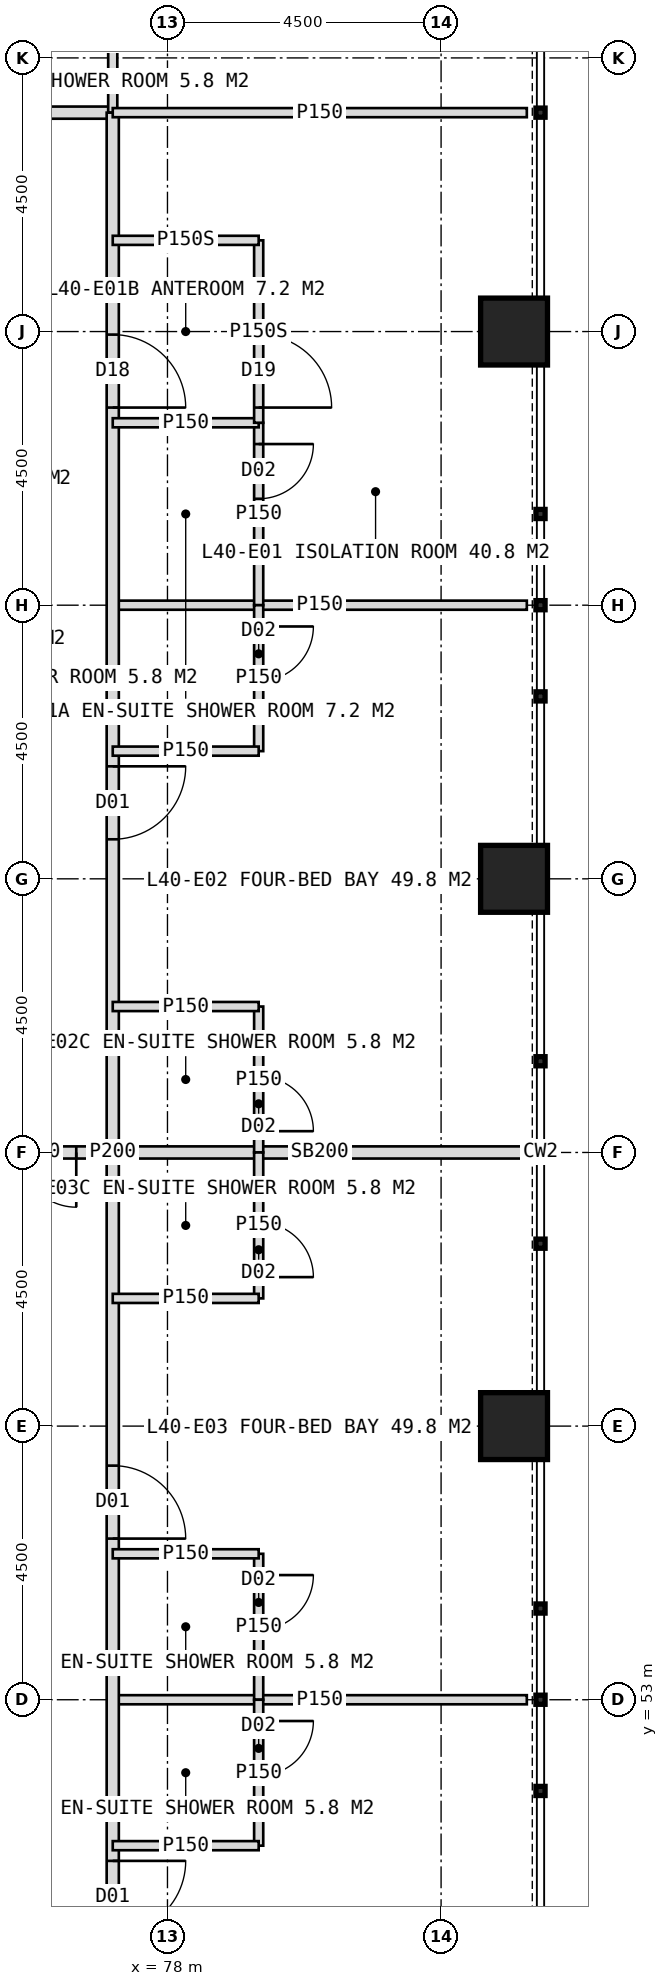
"""IFC4 building model, lengths in metres.
Left out: names, types, materials, properties, quantities, classifications, styles, units other than length and angle.
Written with IfcOpenShell. Run it as: python <this file> out.ifc"""

import sys

from ifc_helpers import new_model, si_unit, direction, frame, frame_2d, origin, origin_2d, place, context, subcontext, project, spatial, rectangle, hollow_rectangle, extrude, element, fill, save


model = new_model("IFC4")
c1 = context("Model", 3, precision=1e-05, world=origin(), true_north=direction((0.0, 1.0)))
c2 = subcontext(c1, "Body", "Model", "MODEL_VIEW")
j1 = project(units=[si_unit("LENGTHUNIT", "METRE"), si_unit("PLANEANGLEUNIT", "RADIAN")], contexts=[c1])
p1 = place(None, origin())
s1 = spatial("IfcSite", under=j1, at=p1, CompositionType="ELEMENT")
p2 = place(p1, origin())
s2 = spatial("IfcBuilding", under=s1, at=p2, CompositionType="ELEMENT")
p3 = place(p2, frame((0.0, 0.0, 168.0)))
s3 = spatial("IfcBuildingStorey", under=s2, at=p3, CompositionType="ELEMENT", Elevation=168.0)
for number, where, z_axis, x_axis in (
    (1, (83.7, 57.5, 0.0), (0.0, 0.0, 1.0), (1.0, 0.0, 0.0)),
    (2, (83.7, 66.5, 0.0), (0.0, 0.0, 1.0), (1.0, 0.0, 0.0)),
    (3, (83.7, 75.5, 0.0), (0.0, 0.0, 1.0), (1.0, 0.0, 0.0)),
):
    element("IfcColumn", number, at=place(p3, frame(where, z_axis=z_axis, x_axis=x_axis)), inside=s3, PredefinedType="COLUMN", context=c2, shape_type="SweptSolid", body=[
        extrude(hollow_rectangle(XDim=1.1, YDim=1.1, WallThickness=0.1, at=origin_2d()), origin(), (0.0, 0.0, 1.0), 4.0),
    ])
p4 = place(p3, frame((42.9, 79.1, 0.0), z_axis=(0.0, 0.0, 1.0), x_axis=(1.0, 0.0, 0.0)))
e4 = element("IfcWall", 4, at=p4, inside=s3, PredefinedType="PARTITIONING", context=c2, shape_type="SweptSolid", body=[
    extrude(rectangle(XDim=34.2, YDim=0.2, at=frame_2d((17.1, 0.0))), origin(), (0.0, 0.0, 1.0), 3.75),
])
p5 = place(p4, frame((3.55, 0.0, 0.0)))
e5 = element("IfcOpeningElement", 5, at=p5, cuts=e4, PredefinedType="OPENING", context=c2, shape_type="SweptSolid", body=[
    extrude(rectangle(XDim=1.0, YDim=2.1, at=frame_2d((0.5, 1.05))), frame((0.0, 0.11, 0.0), z_axis=(0.0, -1.0, 0.0), x_axis=(1.0, 0.0, 0.0)), (0.0, 0.0, 1.0), 0.22),
])
p6 = place(p4, frame((10.75, 0.0, 0.0)))
e6 = element("IfcOpeningElement", 6, at=p6, cuts=e4, PredefinedType="OPENING", context=c2, shape_type="SweptSolid", body=[
    extrude(rectangle(XDim=1.2, YDim=2.2, at=frame_2d((0.6, 1.1))), frame((0.0, 0.11, 0.0), z_axis=(0.0, -1.0, 0.0), x_axis=(1.0, 0.0, 0.0)), (0.0, 0.0, 1.0), 0.22),
])
p7 = place(p4, frame((20.75, 0.0, 0.0)))
e7 = element("IfcOpeningElement", 7, at=p7, cuts=e4, PredefinedType="OPENING", context=c2, shape_type="SweptSolid", body=[
    extrude(rectangle(XDim=1.2, YDim=2.2, at=frame_2d((0.6, 1.1))), frame((0.0, 0.11, 0.0), z_axis=(0.0, -1.0, 0.0), x_axis=(1.0, 0.0, 0.0)), (0.0, 0.0, 1.0), 0.22),
])
p8 = place(p4, frame((27.25, 0.0, 0.0)))
e8 = element("IfcOpeningElement", 8, at=p8, cuts=e4, PredefinedType="OPENING", context=c2, shape_type="SweptSolid", body=[
    extrude(rectangle(XDim=1.2, YDim=2.2, at=frame_2d((0.6, 1.1))), frame((0.0, 0.11, 0.0), z_axis=(0.0, -1.0, 0.0), x_axis=(1.0, 0.0, 0.0)), (0.0, 0.0, 1.0), 0.22),
])
p9 = place(p3, frame((77.1, 79.1, 0.0), z_axis=(0.0, 0.0, 1.0), x_axis=(0.0, 1.0, 0.0)))
e9 = element("IfcWall", 9, at=p9, inside=s3, PredefinedType="PARTITIONING", context=c2, shape_type="SweptSolid", body=[
    extrude(rectangle(XDim=2.4, YDim=0.15, at=frame_2d((1.2, 0.0))), origin(), (0.0, 0.0, 1.0), 3.75),
])
p10 = place(p3, frame((77.1, 71.0, 0.0), z_axis=(0.0, 0.0, 1.0), x_axis=(1.0, 0.0, 0.0)))
e10 = element("IfcWall", 10, at=p10, inside=s3, PredefinedType="PARTITIONING", context=c2, shape_type="SweptSolid", body=[
    extrude(rectangle(XDim=6.81, YDim=0.15, at=frame_2d((3.405, 0.0))), origin(), (0.0, 0.0, 1.0), 3.75),
])
p11 = place(p3, frame((77.1, 62.0, 0.0), z_axis=(0.0, 0.0, 1.0), x_axis=(1.0, 0.0, 0.0)))
e11 = element("IfcWall", 11, at=p11, inside=s3, PredefinedType="SOLIDWALL", context=c2, shape_type="SweptSolid", body=[
    extrude(rectangle(XDim=6.81, YDim=0.2, at=frame_2d((3.405, 0.0))), origin(), (0.0, 0.0, 1.0), 2.95),
])
p12 = place(p3, frame((77.1, 53.0, 0.0), z_axis=(0.0, 0.0, 1.0), x_axis=(1.0, 0.0, 0.0)))
e12 = element("IfcWall", 12, at=p12, inside=s3, PredefinedType="PARTITIONING", context=c2, shape_type="SweptSolid", body=[
    extrude(rectangle(XDim=6.81, YDim=0.15, at=frame_2d((3.405, 0.0))), origin(), (0.0, 0.0, 1.0), 3.75),
])
p13 = place(p3, frame((77.1, 79.1, 0.0), z_axis=(0.0, 0.0, 1.0), x_axis=(0.0, -1.0, 0.0)))
e13 = element("IfcWall", 13, at=p13, inside=s3, PredefinedType="PARTITIONING", context=c2, shape_type="SweptSolid", body=[
    extrude(rectangle(XDim=34.2, YDim=0.2, at=frame_2d((17.1, 0.0))), origin(), (0.0, 0.0, 1.0), 3.75),
])
p14 = place(p13, frame((3.65, 0.0, 0.0)))
e14 = element("IfcOpeningElement", 14, at=p14, cuts=e13, PredefinedType="OPENING", context=c2, shape_type="SweptSolid", body=[
    extrude(rectangle(XDim=1.2, YDim=2.2, at=frame_2d((0.6, 1.1))), frame((0.0, 0.11, 0.0), z_axis=(0.0, -1.0, 0.0), x_axis=(1.0, 0.0, 0.0)), (0.0, 0.0, 1.0), 0.22),
])
p15 = place(p13, frame((10.75, 0.0, 0.0)))
e15 = element("IfcOpeningElement", 15, at=p15, cuts=e13, PredefinedType="OPENING", context=c2, shape_type="SweptSolid", body=[
    extrude(rectangle(XDim=1.2, YDim=2.2, at=frame_2d((0.6, 1.1))), frame((0.0, 0.11, 0.0), z_axis=(0.0, -1.0, 0.0), x_axis=(1.0, 0.0, 0.0)), (0.0, 0.0, 1.0), 0.22),
])
p16 = place(p13, frame((22.25, 0.0, 0.0)))
e16 = element("IfcOpeningElement", 16, at=p16, cuts=e13, PredefinedType="OPENING", context=c2, shape_type="SweptSolid", body=[
    extrude(rectangle(XDim=1.2, YDim=2.2, at=frame_2d((0.6, 1.1))), frame((0.0, 0.11, 0.0), z_axis=(0.0, -1.0, 0.0), x_axis=(1.0, 0.0, 0.0)), (0.0, 0.0, 1.0), 0.22),
])
p17 = place(p13, frame((28.75, 0.0, 0.0)))
e17 = element("IfcOpeningElement", 17, at=p17, cuts=e13, PredefinedType="OPENING", context=c2, shape_type="SweptSolid", body=[
    extrude(rectangle(XDim=1.2, YDim=2.2, at=frame_2d((0.6, 1.1))), frame((0.0, 0.11, 0.0), z_axis=(0.0, -1.0, 0.0), x_axis=(1.0, 0.0, 0.0)), (0.0, 0.0, 1.0), 0.22),
])
p18 = place(p3, frame((77.1, 79.1, 0.0), z_axis=(0.0, 0.0, 1.0), x_axis=(1.0, 0.0, 0.0)))
e18 = element("IfcWall", 18, at=p18, inside=s3, PredefinedType="PARTITIONING", context=c2, shape_type="SweptSolid", body=[
    extrude(rectangle(XDim=6.81, YDim=0.15, at=frame_2d((3.405, 0.0))), origin(), (0.0, 0.0, 1.0), 3.75),
])
p19 = place(p3, frame((79.5, 74.0, 0.0), z_axis=(0.0, 0.0, 1.0), x_axis=(0.0, -1.0, 0.0)))
e19 = element("IfcWall", 19, at=p19, inside=s3, PredefinedType="PARTITIONING", context=c2, shape_type="SweptSolid", body=[
    extrude(rectangle(XDim=3.0, YDim=0.15, at=frame_2d((1.5, 0.0))), origin(), (0.0, 0.0, 1.0), 3.75),
])
p20 = place(p19, frame((0.35, 0.0, 0.0)))
e20 = element("IfcOpeningElement", 20, at=p20, cuts=e19, PredefinedType="OPENING", context=c2, shape_type="SweptSolid", body=[
    extrude(rectangle(XDim=0.9, YDim=2.1, at=frame_2d((0.45, 1.05))), frame((0.0, 0.085, 0.0), z_axis=(0.0, -1.0, 0.0), x_axis=(1.0, 0.0, 0.0)), (0.0, 0.0, 1.0), 0.17),
])
p21 = place(p3, frame((77.1, 74.0, 0.0), z_axis=(0.0, 0.0, 1.0), x_axis=(1.0, 0.0, 0.0)))
e21 = element("IfcWall", 21, at=p21, inside=s3, PredefinedType="PARTITIONING", context=c2, shape_type="SweptSolid", body=[
    extrude(rectangle(XDim=2.4, YDim=0.15, at=frame_2d((1.2, 0.0))), origin(), (0.0, 0.0, 1.0), 3.75),
])
p22 = place(p3, frame((79.5, 77.0, 0.0), z_axis=(0.0, 0.0, 1.0), x_axis=(0.0, -1.0, 0.0)))
e22 = element("IfcWall", 22, at=p22, inside=s3, PredefinedType="PARTITIONING", context=c2, shape_type="SweptSolid", body=[
    extrude(rectangle(XDim=3.0, YDim=0.15, at=frame_2d((1.5, 0.0))), origin(), (0.0, 0.0, 1.0), 3.75),
])
p23 = place(p22, frame((1.55, 0.0, 0.0)))
e23 = element("IfcOpeningElement", 23, at=p23, cuts=e22, PredefinedType="OPENING", context=c2, shape_type="SweptSolid", body=[
    extrude(rectangle(XDim=1.2, YDim=2.2, at=frame_2d((0.6, 1.1))), frame((0.0, 0.085, 0.0), z_axis=(0.0, -1.0, 0.0), x_axis=(1.0, 0.0, 0.0)), (0.0, 0.0, 1.0), 0.17),
])
p24 = place(p3, frame((77.1, 77.0, 0.0), z_axis=(0.0, 0.0, 1.0), x_axis=(1.0, 0.0, 0.0)))
e24 = element("IfcWall", 24, at=p24, inside=s3, PredefinedType="PARTITIONING", context=c2, shape_type="SweptSolid", body=[
    extrude(rectangle(XDim=2.4, YDim=0.15, at=frame_2d((1.2, 0.0))), origin(), (0.0, 0.0, 1.0), 3.75),
])
p25 = place(p3, frame((79.5, 71.0, 0.0), z_axis=(0.0, 0.0, 1.0), x_axis=(0.0, -1.0, 0.0)))
e25 = element("IfcWall", 25, at=p25, inside=s3, PredefinedType="PARTITIONING", context=c2, shape_type="SweptSolid", body=[
    extrude(rectangle(XDim=2.4, YDim=0.15, at=frame_2d((1.2, 0.0))), origin(), (0.0, 0.0, 1.0), 3.75),
])
p26 = place(p25, frame((0.35, 0.0, 0.0)))
e26 = element("IfcOpeningElement", 26, at=p26, cuts=e25, PredefinedType="OPENING", context=c2, shape_type="SweptSolid", body=[
    extrude(rectangle(XDim=0.9, YDim=2.1, at=frame_2d((0.45, 1.05))), frame((0.0, 0.085, 0.0), z_axis=(0.0, -1.0, 0.0), x_axis=(1.0, 0.0, 0.0)), (0.0, 0.0, 1.0), 0.17),
])
p27 = place(p3, frame((77.1, 68.6, 0.0), z_axis=(0.0, 0.0, 1.0), x_axis=(1.0, 0.0, 0.0)))
e27 = element("IfcWall", 27, at=p27, inside=s3, PredefinedType="PARTITIONING", context=c2, shape_type="SweptSolid", body=[
    extrude(rectangle(XDim=2.4, YDim=0.15, at=frame_2d((1.2, 0.0))), origin(), (0.0, 0.0, 1.0), 3.75),
])
p28 = place(p3, frame((79.5, 64.4, 0.0), z_axis=(0.0, 0.0, 1.0), x_axis=(0.0, -1.0, 0.0)))
e28 = element("IfcWall", 28, at=p28, inside=s3, PredefinedType="PARTITIONING", context=c2, shape_type="SweptSolid", body=[
    extrude(rectangle(XDim=2.4, YDim=0.15, at=frame_2d((1.2, 0.0))), origin(), (0.0, 0.0, 1.0), 3.75),
])
p29 = place(p28, frame((1.15, 0.0, 0.0)))
e29 = element("IfcOpeningElement", 29, at=p29, cuts=e28, PredefinedType="OPENING", context=c2, shape_type="SweptSolid", body=[
    extrude(rectangle(XDim=0.9, YDim=2.1, at=frame_2d((0.45, 1.05))), frame((0.0, 0.085, 0.0), z_axis=(0.0, -1.0, 0.0), x_axis=(1.0, 0.0, 0.0)), (0.0, 0.0, 1.0), 0.17),
])
p30 = place(p3, frame((77.1, 64.4, 0.0), z_axis=(0.0, 0.0, 1.0), x_axis=(1.0, 0.0, 0.0)))
e30 = element("IfcWall", 30, at=p30, inside=s3, PredefinedType="PARTITIONING", context=c2, shape_type="SweptSolid", body=[
    extrude(rectangle(XDim=2.4, YDim=0.15, at=frame_2d((1.2, 0.0))), origin(), (0.0, 0.0, 1.0), 3.75),
])
p31 = place(p3, frame((79.5, 55.4, 0.0), z_axis=(0.0, 0.0, 1.0), x_axis=(0.0, -1.0, 0.0)))
e31 = element("IfcWall", 31, at=p31, inside=s3, PredefinedType="PARTITIONING", context=c2, shape_type="SweptSolid", body=[
    extrude(rectangle(XDim=2.4, YDim=0.15, at=frame_2d((1.2, 0.0))), origin(), (0.0, 0.0, 1.0), 3.75),
])
p32 = place(p31, frame((0.35, 0.0, 0.0)))
e32 = element("IfcOpeningElement", 32, at=p32, cuts=e31, PredefinedType="OPENING", context=c2, shape_type="SweptSolid", body=[
    extrude(rectangle(XDim=0.9, YDim=2.1, at=frame_2d((0.45, 1.05))), frame((0.0, 0.085, 0.0), z_axis=(0.0, -1.0, 0.0), x_axis=(1.0, 0.0, 0.0)), (0.0, 0.0, 1.0), 0.17),
])
p33 = place(p3, frame((77.1, 55.4, 0.0), z_axis=(0.0, 0.0, 1.0), x_axis=(1.0, 0.0, 0.0)))
e33 = element("IfcWall", 33, at=p33, inside=s3, PredefinedType="PARTITIONING", context=c2, shape_type="SweptSolid", body=[
    extrude(rectangle(XDim=2.4, YDim=0.15, at=frame_2d((1.2, 0.0))), origin(), (0.0, 0.0, 1.0), 3.75),
])
p34 = place(p3, frame((79.5, 62.0, 0.0), z_axis=(0.0, 0.0, 1.0), x_axis=(0.0, -1.0, 0.0)))
e34 = element("IfcWall", 34, at=p34, inside=s3, PredefinedType="PARTITIONING", context=c2, shape_type="SweptSolid", body=[
    extrude(rectangle(XDim=2.4, YDim=0.15, at=frame_2d((1.2, 0.0))), origin(), (0.0, 0.0, 1.0), 3.75),
])
p35 = place(p34, frame((1.15, 0.0, 0.0)))
e35 = element("IfcOpeningElement", 35, at=p35, cuts=e34, PredefinedType="OPENING", context=c2, shape_type="SweptSolid", body=[
    extrude(rectangle(XDim=0.9, YDim=2.1, at=frame_2d((0.45, 1.05))), frame((0.0, 0.085, 0.0), z_axis=(0.0, -1.0, 0.0), x_axis=(1.0, 0.0, 0.0)), (0.0, 0.0, 1.0), 0.17),
])
p36 = place(p3, frame((77.1, 59.6, 0.0), z_axis=(0.0, 0.0, 1.0), x_axis=(1.0, 0.0, 0.0)))
e36 = element("IfcWall", 36, at=p36, inside=s3, PredefinedType="PARTITIONING", context=c2, shape_type="SweptSolid", body=[
    extrude(rectangle(XDim=2.4, YDim=0.15, at=frame_2d((1.2, 0.0))), origin(), (0.0, 0.0, 1.0), 3.75),
])
p37 = place(p3, frame((79.5, 53.0, 0.0), z_axis=(0.0, 0.0, 1.0), x_axis=(0.0, -1.0, 0.0)))
e37 = element("IfcWall", 37, at=p37, inside=s3, PredefinedType="PARTITIONING", context=c2, shape_type="SweptSolid", body=[
    extrude(rectangle(XDim=2.4, YDim=0.15, at=frame_2d((1.2, 0.0))), origin(), (0.0, 0.0, 1.0), 3.75),
])
p38 = place(p37, frame((0.35, 0.0, 0.0)))
e38 = element("IfcOpeningElement", 38, at=p38, cuts=e37, PredefinedType="OPENING", context=c2, shape_type="SweptSolid", body=[
    extrude(rectangle(XDim=0.9, YDim=2.1, at=frame_2d((0.45, 1.05))), frame((0.0, 0.085, 0.0), z_axis=(0.0, -1.0, 0.0), x_axis=(1.0, 0.0, 0.0)), (0.0, 0.0, 1.0), 0.17),
])
p39 = place(p3, frame((77.1, 50.6, 0.0), z_axis=(0.0, 0.0, 1.0), x_axis=(1.0, 0.0, 0.0)))
e39 = element("IfcWall", 39, at=p39, inside=s3, PredefinedType="PARTITIONING", context=c2, shape_type="SweptSolid", body=[
    extrude(rectangle(XDim=2.4, YDim=0.15, at=frame_2d((1.2, 0.0))), origin(), (0.0, 0.0, 1.0), 3.75),
])
p40 = place(p3, frame((74.4, 62.0, 0.0), z_axis=(0.0, 0.0, 1.0), x_axis=(1.0, 0.0, 0.0)))
e40 = element("IfcWall", 40, at=p40, inside=s3, PredefinedType="SOLIDWALL", context=c2, shape_type="SweptSolid", body=[
    extrude(rectangle(XDim=2.7, YDim=0.2, at=frame_2d((1.35, 0.0))), origin(), (0.0, 0.0, 1.0), 2.95),
])
p41 = place(p40, frame((0.3, 0.0, 0.0)))
e41 = element("IfcOpeningElement", 41, at=p41, cuts=e40, PredefinedType="OPENING", context=c2, shape_type="SweptSolid", body=[
    extrude(rectangle(XDim=1.8, YDim=2.2, at=frame_2d((0.9, 1.1))), frame((0.0, 0.11, 0.0), z_axis=(0.0, -1.0, 0.0), x_axis=(1.0, 0.0, 0.0)), (0.0, 0.0, 1.0), 0.22),
])
p42 = place(p23, origin())
e42 = element("IfcDoor", 42, at=p42, inside=s3, OperationType="SINGLE_SWING_RIGHT", PredefinedType="DOOR", context=c2, shape_type="SweptSolid", body=[
    extrude(rectangle(XDim=1.2, YDim=2.2, at=frame_2d((0.6, 1.1))), frame((0.0, 0.025, 0.0), z_axis=(0.0, -1.0, 0.0), x_axis=(1.0, 0.0, 0.0)), (0.0, 0.0, 1.0), 0.05),
])
fill(e23, e42)
p43 = place(p14, origin())
e43 = element("IfcDoor", 43, at=p43, inside=s3, OperationType="SINGLE_SWING_RIGHT", PredefinedType="DOOR", context=c2, shape_type="SweptSolid", body=[
    extrude(rectangle(XDim=1.2, YDim=2.2, at=frame_2d((0.6, 1.1))), frame((0.0, 0.025, 0.0), z_axis=(0.0, -1.0, 0.0), x_axis=(1.0, 0.0, 0.0)), (0.0, 0.0, 1.0), 0.05),
])
fill(e14, e43)
p44 = place(p20, origin())
e44 = element("IfcDoor", 44, at=p44, inside=s3, OperationType="SINGLE_SWING_LEFT", PredefinedType="DOOR", context=c2, shape_type="SweptSolid", body=[
    extrude(rectangle(XDim=0.9, YDim=2.1, at=frame_2d((0.45, 1.05))), frame((0.0, 0.025, 0.0), z_axis=(0.0, -1.0, 0.0), x_axis=(1.0, 0.0, 0.0)), (0.0, 0.0, 1.0), 0.05),
])
fill(e20, e44)
p45 = place(p15, origin())
e45 = element("IfcDoor", 45, at=p45, inside=s3, OperationType="SINGLE_SWING_LEFT", PredefinedType="DOOR", context=c2, shape_type="SweptSolid", body=[
    extrude(rectangle(XDim=1.2, YDim=2.2, at=frame_2d((0.6, 1.1))), frame((0.0, 0.025, 0.0), z_axis=(0.0, -1.0, 0.0), x_axis=(1.0, 0.0, 0.0)), (0.0, 0.0, 1.0), 0.05),
])
fill(e15, e45)
p46 = place(p26, origin())
e46 = element("IfcDoor", 46, at=p46, inside=s3, OperationType="SINGLE_SWING_LEFT", PredefinedType="DOOR", context=c2, shape_type="SweptSolid", body=[
    extrude(rectangle(XDim=0.9, YDim=2.1, at=frame_2d((0.45, 1.05))), frame((0.0, 0.025, 0.0), z_axis=(0.0, -1.0, 0.0), x_axis=(1.0, 0.0, 0.0)), (0.0, 0.0, 1.0), 0.05),
])
fill(e26, e46)
p47 = place(p29, origin())
e47 = element("IfcDoor", 47, at=p47, inside=s3, OperationType="SINGLE_SWING_RIGHT", PredefinedType="DOOR", context=c2, shape_type="SweptSolid", body=[
    extrude(rectangle(XDim=0.9, YDim=2.1, at=frame_2d((0.45, 1.05))), frame((0.0, 0.025, 0.0), z_axis=(0.0, -1.0, 0.0), x_axis=(1.0, 0.0, 0.0)), (0.0, 0.0, 1.0), 0.05),
])
fill(e29, e47)
p48 = place(p16, origin())
e48 = element("IfcDoor", 48, at=p48, inside=s3, OperationType="SINGLE_SWING_RIGHT", PredefinedType="DOOR", context=c2, shape_type="SweptSolid", body=[
    extrude(rectangle(XDim=1.2, YDim=2.2, at=frame_2d((0.6, 1.1))), frame((0.0, 0.025, 0.0), z_axis=(0.0, -1.0, 0.0), x_axis=(1.0, 0.0, 0.0)), (0.0, 0.0, 1.0), 0.05),
])
fill(e16, e48)
p49 = place(p32, origin())
e49 = element("IfcDoor", 49, at=p49, inside=s3, OperationType="SINGLE_SWING_LEFT", PredefinedType="DOOR", context=c2, shape_type="SweptSolid", body=[
    extrude(rectangle(XDim=0.9, YDim=2.1, at=frame_2d((0.45, 1.05))), frame((0.0, 0.025, 0.0), z_axis=(0.0, -1.0, 0.0), x_axis=(1.0, 0.0, 0.0)), (0.0, 0.0, 1.0), 0.05),
])
fill(e32, e49)
p50 = place(p35, origin())
e50 = element("IfcDoor", 50, at=p50, inside=s3, OperationType="SINGLE_SWING_RIGHT", PredefinedType="DOOR", context=c2, shape_type="SweptSolid", body=[
    extrude(rectangle(XDim=0.9, YDim=2.1, at=frame_2d((0.45, 1.05))), frame((0.0, 0.025, 0.0), z_axis=(0.0, -1.0, 0.0), x_axis=(1.0, 0.0, 0.0)), (0.0, 0.0, 1.0), 0.05),
])
fill(e35, e50)
p51 = place(p17, origin())
e51 = element("IfcDoor", 51, at=p51, inside=s3, OperationType="SINGLE_SWING_LEFT", PredefinedType="DOOR", context=c2, shape_type="SweptSolid", body=[
    extrude(rectangle(XDim=1.2, YDim=2.2, at=frame_2d((0.6, 1.1))), frame((0.0, 0.025, 0.0), z_axis=(0.0, -1.0, 0.0), x_axis=(1.0, 0.0, 0.0)), (0.0, 0.0, 1.0), 0.05),
])
fill(e17, e51)
p52 = place(p38, origin())
e52 = element("IfcDoor", 52, at=p52, inside=s3, OperationType="SINGLE_SWING_LEFT", PredefinedType="DOOR", context=c2, shape_type="SweptSolid", body=[
    extrude(rectangle(XDim=0.9, YDim=2.1, at=frame_2d((0.45, 1.05))), frame((0.0, 0.025, 0.0), z_axis=(0.0, -1.0, 0.0), x_axis=(1.0, 0.0, 0.0)), (0.0, 0.0, 1.0), 0.05),
])
fill(e38, e52)
p53 = place(p41, origin())
e53 = element("IfcDoor", 53, at=p53, inside=s3, OperationType="DOUBLE_DOOR_DOUBLE_SWING", PredefinedType="DOOR", context=c2, shape_type="SweptSolid", body=[
    extrude(rectangle(XDim=1.8, YDim=2.2, at=frame_2d((0.9, 1.1))), frame((0.0, 0.025, 0.0), z_axis=(0.0, -1.0, 0.0), x_axis=(1.0, 0.0, 0.0)), (0.0, 0.0, 1.0), 0.05),
])
fill(e41, e53)
save(model, sys.argv[1])
